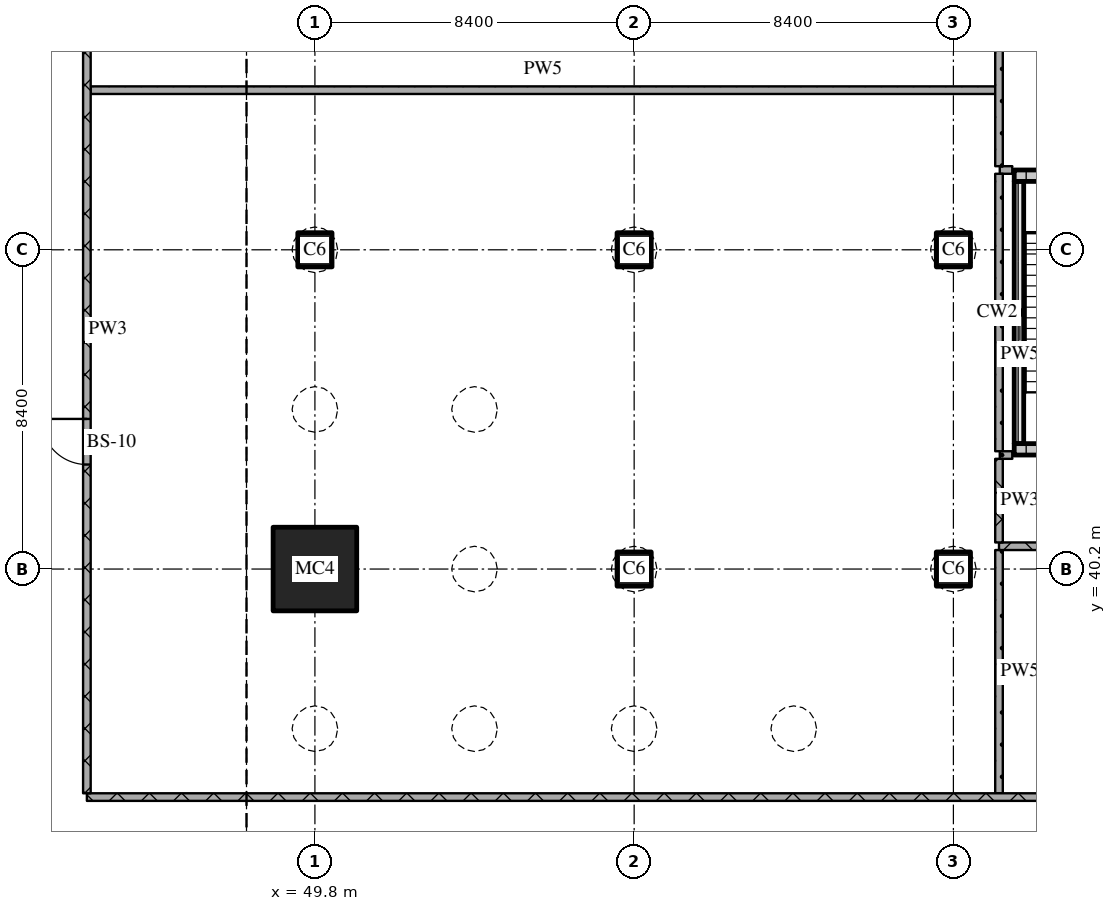
"""IFC4 building model, lengths in metres.
Left out: names, types, materials, properties, quantities, classifications, styles, units other than length and angle.
Written with IfcOpenShell. Run it as: python <this file> out.ifc"""

import sys

from ifc_helpers import new_model, si_unit, direction, frame, frame_2d, origin, origin_2d, place, context, subcontext, project, spatial, rectangle, extrude, element, fill, save


model = new_model("IFC4")
c1 = context("Model", 3, precision=1e-05, world=origin(), true_north=direction((0.0, 1.0)))
c2 = subcontext(c1, "Body", "Model", "MODEL_VIEW")
j1 = project(units=[si_unit("LENGTHUNIT", "METRE"), si_unit("PLANEANGLEUNIT", "RADIAN")], contexts=[c1])
p1 = place(None, origin())
s1 = spatial("IfcSite", under=j1, at=p1, CompositionType="ELEMENT")
p2 = place(p1, origin())
s2 = spatial("IfcBuilding", under=s1, at=p2, CompositionType="ELEMENT")
p3 = place(p2, frame((0.0, 0.0, -6.0)))
s3 = spatial("IfcBuildingStorey", under=s2, at=p3, CompositionType="ELEMENT", Elevation=-6.0)
p4 = place(p3, frame((49.8, 40.2, 0.0), z_axis=(0.0, 0.0, 1.0), x_axis=(1.0, 0.0, 0.0)))
e1 = element("IfcColumn", 1, at=p4, inside=s3, PredefinedType="COLUMN", context=c2, shape_type="SweptSolid", body=[
    extrude(rectangle(XDim=2.2, YDim=2.2, at=origin_2d()), origin(), (0.0, 0.0, 1.0), 6.0),
])
for number, where, z_axis, x_axis in (
    (2, (49.8, 48.6, 0.0), (0.0, 0.0, 1.0), (1.0, 0.0, 0.0)),
    (3, (58.2, 40.2, 0.0), (0.0, 0.0, 1.0), (1.0, 0.0, 0.0)),
    (4, (58.2, 48.6, 0.0), (0.0, 0.0, 1.0), (1.0, 0.0, 0.0)),
    (5, (66.6, 40.2, 0.0), (0.0, 0.0, 1.0), (1.0, 0.0, 0.0)),
    (6, (66.6, 48.6, 0.0), (0.0, 0.0, 1.0), (1.0, 0.0, 0.0)),
):
    element("IfcColumn", number, at=place(p3, frame(where, z_axis=z_axis, x_axis=x_axis)), inside=s3, PredefinedType="COLUMN", context=c2, shape_type="SweptSolid", body=[
        extrude(rectangle(XDim=0.9, YDim=0.9, at=origin_2d()), origin(), (0.0, 0.0, 1.0), 6.0),
    ])
p5 = place(p3, frame((68.2, 43.35, 0.0), z_axis=(0.0, 0.0, 1.0), x_axis=(1.0, 0.0, 0.0)))
e7 = element("IfcWall", 7, at=p5, inside=s3, PredefinedType="SOLIDWALL", context=c2, shape_type="SweptSolid", body=[
    extrude(rectangle(XDim=5.6, YDim=0.3, at=frame_2d((2.8, 0.0))), origin(), (0.0, 0.0, 1.0), 5.7),
])
p6 = place(p5, frame((3.875, 0.0, 0.0)))
e8 = element("IfcOpeningElement", 8, at=p6, cuts=e7, PredefinedType="OPENING", context=c2, shape_type="SweptSolid", body=[
    extrude(rectangle(XDim=1.0, YDim=2.1, at=frame_2d((0.5, 1.05))), frame((0.0, 0.16, 0.0), z_axis=(0.0, -1.0, 0.0), x_axis=(1.0, 0.0, 0.0)), (0.0, 0.0, 1.0), 0.32),
])
p7 = place(p3, frame((68.325, 43.5, 0.0), z_axis=(0.0, 0.0, 1.0), x_axis=(0.0, 1.0, 0.0)))
e9 = element("IfcWall", 9, at=p7, inside=s3, PredefinedType="SOLIDWALL", context=c2, shape_type="SweptSolid", body=[
    extrude(rectangle(XDim=6.9, YDim=0.25, at=frame_2d((3.45, 0.0))), origin(), (0.0, 0.0, 1.0), 5.7),
])
p8 = place(p3, frame((68.2, 50.55, 0.0), z_axis=(0.0, 0.0, 1.0), x_axis=(1.0, 0.0, 0.0)))
e10 = element("IfcWall", 10, at=p8, inside=s3, PredefinedType="SOLIDWALL", context=c2, shape_type="SweptSolid", body=[
    extrude(rectangle(XDim=5.6, YDim=0.3, at=frame_2d((2.8, 0.0))), origin(), (0.0, 0.0, 1.0), 5.7),
])
p9 = place(p3, frame((43.8, 34.2, 0.0), z_axis=(0.0, 0.0, 1.0), x_axis=(1.0, 0.0, 0.0)))
e11 = element("IfcWall", 11, at=p9, inside=s3, PredefinedType="PARTITIONING", context=c2, shape_type="SweptSolid", body=[
    extrude(rectangle(XDim=87.6, YDim=0.2, at=frame_2d((43.8, 0.0))), origin(), (0.0, 0.0, 1.0), 5.7),
])
p10 = place(p9, frame((29.1, 0.0, 0.0)))
e12 = element("IfcOpeningElement", 12, at=p10, cuts=e11, PredefinedType="OPENING", context=c2, shape_type="SweptSolid", body=[
    extrude(rectangle(XDim=1.2, YDim=2.1, at=frame_2d((0.6, 1.05))), frame((0.0, 0.11, 0.0), z_axis=(0.0, -1.0, 0.0), x_axis=(1.0, 0.0, 0.0)), (0.0, 0.0, 1.0), 0.22),
])
p11 = place(p9, frame((43.1, 0.0, 0.0)))
e13 = element("IfcOpeningElement", 13, at=p11, cuts=e11, PredefinedType="OPENING", context=c2, shape_type="SweptSolid", body=[
    extrude(rectangle(XDim=1.2, YDim=2.1, at=frame_2d((0.6, 1.05))), frame((0.0, 0.11, 0.0), z_axis=(0.0, -1.0, 0.0), x_axis=(1.0, 0.0, 0.0)), (0.0, 0.0, 1.0), 0.22),
])
p12 = place(p9, frame((57.2, 0.0, 0.0)))
e14 = element("IfcOpeningElement", 14, at=p12, cuts=e11, PredefinedType="OPENING", context=c2, shape_type="SweptSolid", body=[
    extrude(rectangle(XDim=1.2, YDim=2.1, at=frame_2d((0.6, 1.05))), frame((0.0, 0.11, 0.0), z_axis=(0.0, -1.0, 0.0), x_axis=(1.0, 0.0, 0.0)), (0.0, 0.0, 1.0), 0.22),
])
p13 = place(p9, frame((75.0, 0.0, 0.0)))
e15 = element("IfcOpeningElement", 15, at=p13, cuts=e11, PredefinedType="OPENING", context=c2, shape_type="SweptSolid", body=[
    extrude(rectangle(XDim=1.2, YDim=2.1, at=frame_2d((0.6, 1.05))), frame((0.0, 0.11, 0.0), z_axis=(0.0, -1.0, 0.0), x_axis=(1.0, 0.0, 0.0)), (0.0, 0.0, 1.0), 0.22),
])
p14 = place(p3, frame((67.8, 40.8, 0.0), z_axis=(0.0, 0.0, 1.0), x_axis=(1.0, 0.0, 0.0)))
e16 = element("IfcWall", 16, at=p14, inside=s3, PredefinedType="PARTITIONING", context=c2, shape_type="SweptSolid", body=[
    extrude(rectangle(XDim=7.2, YDim=0.2, at=frame_2d((3.6, 0.0))), origin(), (0.0, 0.0, 1.0), 5.7),
])
for number, where, z_axis, x_axis in (
    (17, (67.82, 43.2, 0.0), (0.0, 0.0, 1.0), (1.0, 0.0, 0.0)),
    (18, (67.82, 50.7, 0.0), (0.0, 0.0, 1.0), (1.0, 0.0, 0.0)),
):
    element("IfcWall", number, at=place(p3, frame(where, z_axis=z_axis, x_axis=x_axis)), inside=s3, PredefinedType="PARTITIONING", context=c2, shape_type="SweptSolid", body=[
        extrude(rectangle(XDim=0.33, YDim=0.2, at=frame_2d((0.165, 0.0))), origin(), (0.0, 0.0, 1.0), 5.7),
    ])
p15 = place(p3, frame((43.9, 52.8, 0.0), z_axis=(0.0, 0.0, 1.0), x_axis=(1.0, 0.0, 0.0)))
e19 = element("IfcWall", 19, at=p15, inside=s3, PredefinedType="PARTITIONING", context=c2, shape_type="SweptSolid", body=[
    extrude(rectangle(XDim=23.8, YDim=0.2, at=frame_2d((11.9, 0.0))), origin(), (0.0, 0.0, 1.0), 5.7),
])
p16 = place(p3, frame((43.8, 58.7, 0.0), z_axis=(0.0, 0.0, 1.0), x_axis=(0.0, -1.0, 0.0)))
e20 = element("IfcWall", 20, at=p16, inside=s3, PredefinedType="PARTITIONING", context=c2, shape_type="SweptSolid", body=[
    extrude(rectangle(XDim=24.4, YDim=0.2, at=frame_2d((12.2, 0.0))), origin(), (0.0, 0.0, 1.0), 5.2),
])
p17 = place(p16, frame((14.55, 0.0, 0.0)))
e21 = element("IfcOpeningElement", 21, at=p17, cuts=e20, PredefinedType="OPENING", context=c2, shape_type="SweptSolid", body=[
    extrude(rectangle(XDim=1.2, YDim=2.1, at=frame_2d((0.6, 1.05))), frame((0.0, 0.11, 0.0), z_axis=(0.0, -1.0, 0.0), x_axis=(1.0, 0.0, 0.0)), (0.0, 0.0, 1.0), 0.22),
])
p18 = place(p3, frame((67.8, 43.1, 0.0), z_axis=(0.0, 0.0, 1.0), x_axis=(0.0, -1.0, 0.0)))
e22 = element("IfcWall", 22, at=p18, inside=s3, PredefinedType="PARTITIONING", context=c2, shape_type="SweptSolid", body=[
    extrude(rectangle(XDim=2.2, YDim=0.2, at=frame_2d((1.1, 0.0))), origin(), (0.0, 0.0, 1.0), 5.7),
])
p19 = place(p3, frame((67.8, 50.6, 0.0), z_axis=(0.0, 0.0, 1.0), x_axis=(0.0, -1.0, 0.0)))
e23 = element("IfcWall", 23, at=p19, inside=s3, PredefinedType="PARTITIONING", context=c2, shape_type="SweptSolid", body=[
    extrude(rectangle(XDim=7.3, YDim=0.2, at=frame_2d((3.65, 0.0))), origin(), (0.0, 0.0, 1.0), 5.7),
])
p20 = place(p3, frame((67.8, 40.7, 0.0), z_axis=(0.0, 0.0, 1.0), x_axis=(0.0, -1.0, 0.0)))
e24 = element("IfcWall", 24, at=p20, inside=s3, PredefinedType="PARTITIONING", context=c2, shape_type="SweptSolid", body=[
    extrude(rectangle(XDim=6.4, YDim=0.2, at=frame_2d((3.2, 0.0))), origin(), (0.0, 0.0, 1.0), 5.7),
])
p21 = place(p3, frame((67.8, 58.7, 0.0), z_axis=(0.0, 0.0, 1.0), x_axis=(0.0, -1.0, 0.0)))
e25 = element("IfcWall", 25, at=p21, inside=s3, PredefinedType="PARTITIONING", context=c2, shape_type="SweptSolid", body=[
    extrude(rectangle(XDim=7.9, YDim=0.2, at=frame_2d((3.95, 0.0))), origin(), (0.0, 0.0, 1.0), 5.7),
])
p22 = place(p17, origin())
e26 = element("IfcDoor", 26, at=p22, inside=s3, OperationType="SINGLE_SWING_RIGHT", PredefinedType="DOOR", context=c2, shape_type="SweptSolid", body=[
    extrude(rectangle(XDim=1.2, YDim=2.1, at=frame_2d((0.6, 1.05))), frame((0.0, 0.025, 0.0), z_axis=(0.0, -1.0, 0.0), x_axis=(1.0, 0.0, 0.0)), (0.0, 0.0, 1.0), 0.05),
])
fill(e21, e26)
save(model, sys.argv[1])
